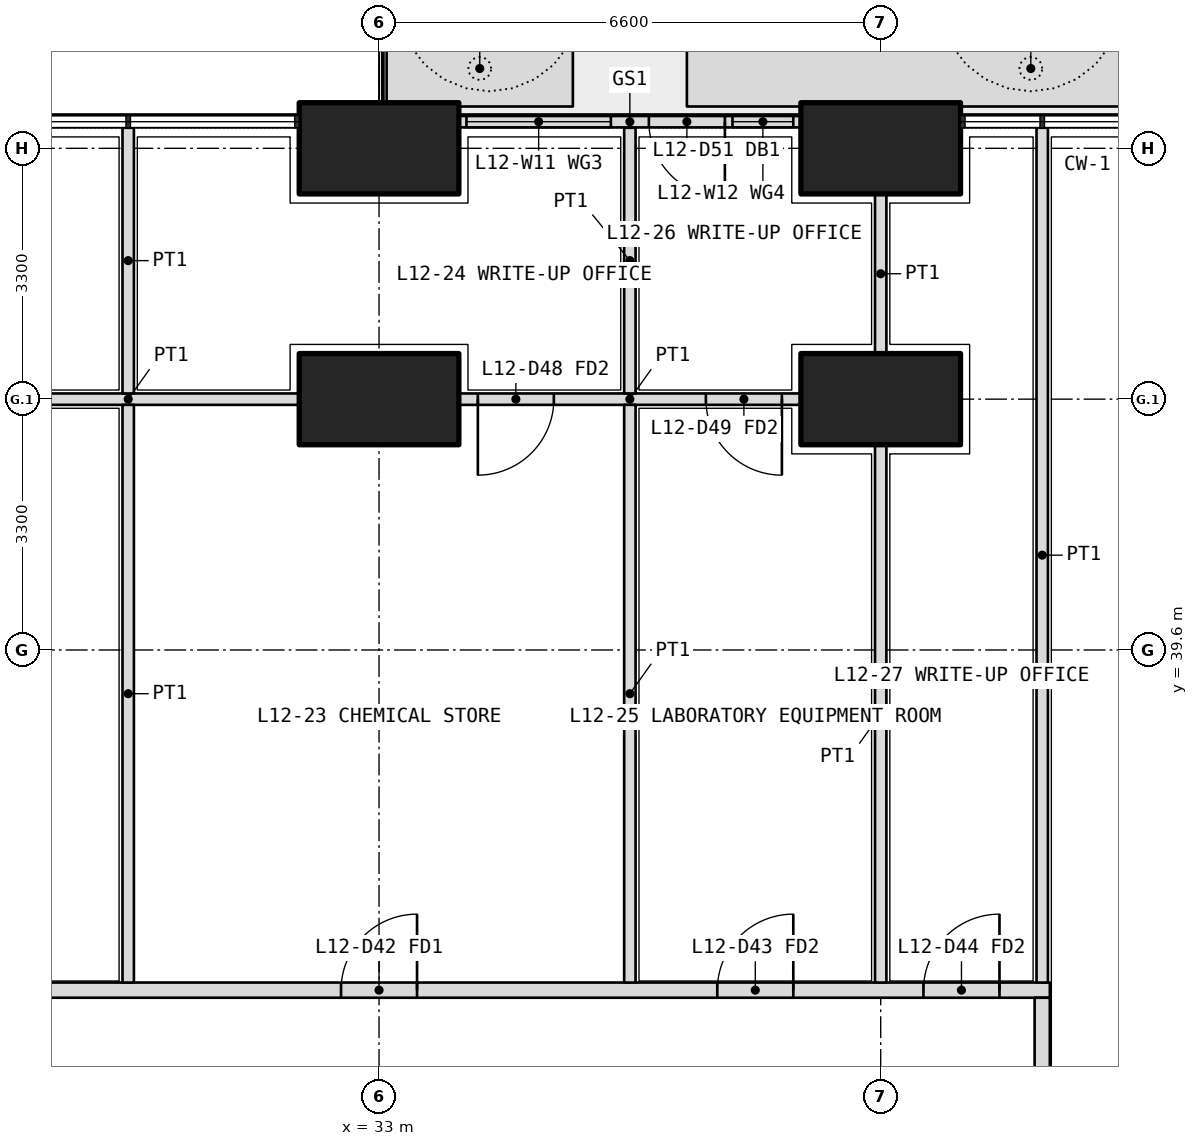
"""IFC4 building model, lengths in metres.
Left out: names, types, materials, properties, quantities, classifications, styles, units other than length and angle.
Written with IfcOpenShell. Run it as: python <this file> out.ifc"""

import sys

from ifc_helpers import new_model, si_unit, direction, frame, frame_2d, origin, origin_2d, place, context, subcontext, project, spatial, polyline, rectangle, outline, extrude, element, fill, save


model = new_model("IFC4")
c1 = context("Model", 3, precision=1e-05, world=origin(), true_north=direction((0.0, 1.0)))
c2 = subcontext(c1, "Body", "Model", "MODEL_VIEW")
j1 = project(units=[si_unit("LENGTHUNIT", "METRE"), si_unit("PLANEANGLEUNIT", "RADIAN")], contexts=[c1])
p1 = place(None, origin())
s1 = spatial("IfcSite", under=j1, at=p1, CompositionType="ELEMENT")
p2 = place(p1, origin())
s2 = spatial("IfcBuilding", under=s1, at=p2, CompositionType="ELEMENT")
p3 = place(p2, frame((0.0, 0.0, 54.9)))
s3 = spatial("IfcBuildingStorey", under=s2, at=p3, CompositionType="ELEMENT", Elevation=54.9)
for number, where, z_axis, x_axis in (
    (1, (33.0, 46.2, 0.0), (0.0, 0.0, 1.0), (1.0, 0.0, 0.0)),
    (2, (39.6, 46.2, 0.0), (0.0, 0.0, 1.0), (1.0, 0.0, 0.0)),
    (3, (33.0, 42.9, 0.0), (0.0, 0.0, 1.0), (1.0, 0.0, 0.0)),
    (4, (39.6, 42.9, 0.0), (0.0, 0.0, 1.0), (1.0, 0.0, 0.0)),
):
    element("IfcColumn", number, at=place(p3, frame(where, z_axis=z_axis, x_axis=x_axis)), inside=s3, PredefinedType="COLUMN", context=c2, shape_type="SweptSolid", body=[
        extrude(rectangle(XDim=2.1, YDim=1.2, at=origin_2d()), origin(), (0.0, 0.0, 1.0), 4.2),
    ])
p4 = place(p3, origin())
e5 = element("IfcWall", 5, at=p4, inside=s3, PredefinedType="USERDEFINED", context=c2, shape_type="SweptSolid", body=[
    extrude(outline(polyline([(33.1, 46.75), (35.55, 46.75), (35.55, 47.75), (33.1, 47.75), (33.1, 46.75)]), holes=[polyline([(33.25, 46.9), (35.4, 46.9), (35.4, 47.6), (33.25, 47.6), (33.25, 46.9)])]), origin(), (0.0, 0.0, 1.0), 1.05),
])
p5 = place(p3, origin())
e6 = element("IfcWall", 6, at=p5, inside=s3, PredefinedType="USERDEFINED", context=c2, shape_type="SweptSolid", body=[
    extrude(outline(polyline([(37.05, 46.75), (46.1, 46.75), (46.1, 47.75), (37.05, 47.75), (37.05, 46.75)]), holes=[polyline([(37.2, 46.9), (45.95, 46.9), (45.95, 47.6), (37.2, 47.6), (37.2, 46.9)])]), origin(), (0.0, 0.0, 1.0), 1.05),
])
p6 = place(p3, frame((38.55, 46.55, 0.0), z_axis=(0.0, 0.0, 1.0), x_axis=(-1.0, 0.0, 0.0)))
e7 = element("IfcWall", 7, at=p6, inside=s3, PredefinedType="SOLIDWALL", context=c2, shape_type="SweptSolid", body=[
    extrude(rectangle(XDim=4.5, YDim=0.15, at=frame_2d((2.25, 0.0))), origin(), (0.0, 0.0, 1.0), 2.7),
])
p7 = place(p6, frame((1.0, 0.0, 0.0)))
e8 = element("IfcOpeningElement", 8, at=p7, cuts=e7, PredefinedType="OPENING", context=c2, shape_type="SweptSolid", body=[
    extrude(rectangle(XDim=1.0, YDim=2.4, at=frame_2d((0.5, 1.2))), frame((0.0, 0.085, 0.0), z_axis=(0.0, -1.0, 0.0), x_axis=(1.0, 0.0, 0.0)), (0.0, 0.0, 1.0), 0.17),
])
p8 = place(p6, frame((0.1, 0.0, 0.1)))
e9 = element("IfcOpeningElement", 9, at=p8, cuts=e7, PredefinedType="OPENING", context=c2, shape_type="SweptSolid", body=[
    extrude(rectangle(XDim=0.8, YDim=2.3, at=frame_2d((0.4, 1.15))), frame((0.0, 0.085, 0.0), z_axis=(0.0, -1.0, 0.0), x_axis=(1.0, 0.0, 0.0)), (0.0, 0.0, 1.0), 0.17),
])
p9 = place(p6, frame((2.5, 0.0, 0.1)))
e10 = element("IfcOpeningElement", 10, at=p9, cuts=e7, PredefinedType="OPENING", context=c2, shape_type="SweptSolid", body=[
    extrude(rectangle(XDim=1.9, YDim=2.3, at=frame_2d((0.95, 1.15))), frame((0.0, 0.085, 0.0), z_axis=(0.0, -1.0, 0.0), x_axis=(1.0, 0.0, 0.0)), (0.0, 0.0, 1.0), 0.17),
])
p10 = place(p3, frame((10.975, 35.125, 0.0), z_axis=(0.0, 0.0, 1.0), x_axis=(1.0, 0.0, 0.0)))
e11 = element("IfcWall", 11, at=p10, inside=s3, PredefinedType="PARTITIONING", context=c2, shape_type="SweptSolid", body=[
    extrude(rectangle(XDim=30.85, YDim=0.2, at=frame_2d((15.425, 0.0))), origin(), (0.0, 0.0, 1.0), 2.85),
])
p11 = place(p10, frame((2.312, 0.0, 0.0)))
e12 = element("IfcOpeningElement", 12, at=p11, cuts=e11, PredefinedType="OPENING", context=c2, shape_type="SweptSolid", body=[
    extrude(rectangle(XDim=1.0, YDim=2.1, at=frame_2d((0.5, 1.05))), frame((0.0, 0.11, 0.0), z_axis=(0.0, -1.0, 0.0), x_axis=(1.0, 0.0, 0.0)), (0.0, 0.0, 1.0), 0.22),
])
p12 = place(p10, frame((11.625, 0.0, 0.0)))
e13 = element("IfcOpeningElement", 13, at=p12, cuts=e11, PredefinedType="OPENING", context=c2, shape_type="SweptSolid", body=[
    extrude(rectangle(XDim=1.0, YDim=2.1, at=frame_2d((0.5, 1.05))), frame((0.0, 0.11, 0.0), z_axis=(0.0, -1.0, 0.0), x_axis=(1.0, 0.0, 0.0)), (0.0, 0.0, 1.0), 0.22),
])
p13 = place(p10, frame((21.525, 0.0, 0.0)))
e14 = element("IfcOpeningElement", 14, at=p13, cuts=e11, PredefinedType="OPENING", context=c2, shape_type="SweptSolid", body=[
    extrude(rectangle(XDim=1.0, YDim=2.1, at=frame_2d((0.5, 1.05))), frame((0.0, 0.11, 0.0), z_axis=(0.0, -1.0, 0.0), x_axis=(1.0, 0.0, 0.0)), (0.0, 0.0, 1.0), 0.22),
])
p14 = place(p10, frame((26.475, 0.0, 0.0)))
e15 = element("IfcOpeningElement", 15, at=p14, cuts=e11, PredefinedType="OPENING", context=c2, shape_type="SweptSolid", body=[
    extrude(rectangle(XDim=1.0, YDim=2.1, at=frame_2d((0.5, 1.05))), frame((0.0, 0.11, 0.0), z_axis=(0.0, -1.0, 0.0), x_axis=(1.0, 0.0, 0.0)), (0.0, 0.0, 1.0), 0.22),
])
p15 = place(p10, frame((29.188, 0.0, 0.0)))
e16 = element("IfcOpeningElement", 16, at=p15, cuts=e11, PredefinedType="OPENING", context=c2, shape_type="SweptSolid", body=[
    extrude(rectangle(XDim=1.0, YDim=2.1, at=frame_2d((0.5, 1.05))), frame((0.0, 0.11, 0.0), z_axis=(0.0, -1.0, 0.0), x_axis=(1.0, 0.0, 0.0)), (0.0, 0.0, 1.0), 0.22),
])
p16 = place(p3, frame((41.725, 11.175, 0.0), z_axis=(0.0, 0.0, 1.0), x_axis=(0.0, 1.0, 0.0)))
e17 = element("IfcWall", 17, at=p16, inside=s3, PredefinedType="PARTITIONING", context=c2, shape_type="SweptSolid", body=[
    extrude(rectangle(XDim=23.85, YDim=0.2, at=frame_2d((11.925, 0.0))), origin(), (0.0, 0.0, 1.0), 2.85),
])
p17 = place(p16, frame((2.012, 0.0, 0.0)))
e18 = element("IfcOpeningElement", 18, at=p17, cuts=e17, PredefinedType="OPENING", context=c2, shape_type="SweptSolid", body=[
    extrude(rectangle(XDim=1.2, YDim=2.1, at=frame_2d((0.6, 1.05))), frame((0.0, 0.11, 0.0), z_axis=(0.0, -1.0, 0.0), x_axis=(1.0, 0.0, 0.0)), (0.0, 0.0, 1.0), 0.22),
])
p18 = place(p16, frame((6.475, 0.0, 0.0)))
e19 = element("IfcOpeningElement", 19, at=p18, cuts=e17, PredefinedType="OPENING", context=c2, shape_type="SweptSolid", body=[
    extrude(rectangle(XDim=1.0, YDim=2.1, at=frame_2d((0.5, 1.05))), frame((0.0, 0.11, 0.0), z_axis=(0.0, -1.0, 0.0), x_axis=(1.0, 0.0, 0.0)), (0.0, 0.0, 1.0), 0.22),
])
p19 = place(p16, frame((9.625, 0.0, 0.0)))
e20 = element("IfcOpeningElement", 20, at=p19, cuts=e17, PredefinedType="OPENING", context=c2, shape_type="SweptSolid", body=[
    extrude(rectangle(XDim=1.0, YDim=2.1, at=frame_2d((0.5, 1.05))), frame((0.0, 0.11, 0.0), z_axis=(0.0, -1.0, 0.0), x_axis=(1.0, 0.0, 0.0)), (0.0, 0.0, 1.0), 0.22),
])
p20 = place(p16, frame((12.975, 0.0, 0.0)))
e21 = element("IfcOpeningElement", 21, at=p20, cuts=e17, PredefinedType="OPENING", context=c2, shape_type="SweptSolid", body=[
    extrude(rectangle(XDim=0.9, YDim=2.1, at=frame_2d((0.45, 1.05))), frame((0.0, 0.11, 0.0), z_axis=(0.0, -1.0, 0.0), x_axis=(1.0, 0.0, 0.0)), (0.0, 0.0, 1.0), 0.22),
])
p21 = place(p16, frame((16.375, 0.0, 0.0)))
e22 = element("IfcOpeningElement", 22, at=p21, cuts=e17, PredefinedType="OPENING", context=c2, shape_type="SweptSolid", body=[
    extrude(rectangle(XDim=1.0, YDim=2.1, at=frame_2d((0.5, 1.05))), frame((0.0, 0.11, 0.0), z_axis=(0.0, -1.0, 0.0), x_axis=(1.0, 0.0, 0.0)), (0.0, 0.0, 1.0), 0.22),
])
p22 = place(p16, frame((20.738, 0.0, 0.0)))
e23 = element("IfcOpeningElement", 23, at=p22, cuts=e17, PredefinedType="OPENING", context=c2, shape_type="SweptSolid", body=[
    extrude(rectangle(XDim=1.0, YDim=2.1, at=frame_2d((0.5, 1.05))), frame((0.0, 0.11, 0.0), z_axis=(0.0, -1.0, 0.0), x_axis=(1.0, 0.0, 0.0)), (0.0, 0.0, 1.0), 0.22),
])
p23 = place(p3, frame((41.725, 46.47, 0.0), z_axis=(0.0, 0.0, 1.0), x_axis=(0.0, -1.0, 0.0)))
e24 = element("IfcWall", 24, at=p23, inside=s3, PredefinedType="PARTITIONING", context=c2, shape_type="SweptSolid", body=[
    extrude(rectangle(XDim=11.245, YDim=0.15, at=frame_2d((5.623, 0.0))), origin(), (0.0, 0.0, 1.0), 2.7),
])
p24 = place(p3, frame((38.55, 42.9, 0.0), z_axis=(0.0, 0.0, 1.0), x_axis=(-1.0, 0.0, 0.0)))
e25 = element("IfcWall", 25, at=p24, inside=s3, PredefinedType="PARTITIONING", context=c2, shape_type="SweptSolid", body=[
    extrude(rectangle(XDim=4.5, YDim=0.15, at=frame_2d((2.25, 0.0))), origin(), (0.0, 0.0, 1.0), 3.9),
])
p25 = place(p24, frame((3.25, 0.0, 0.0)))
e26 = element("IfcOpeningElement", 26, at=p25, cuts=e25, PredefinedType="OPENING", context=c2, shape_type="SweptSolid", body=[
    extrude(rectangle(XDim=1.0, YDim=2.1, at=frame_2d((0.5, 1.05))), frame((0.0, 0.085, 0.0), z_axis=(0.0, -1.0, 0.0), x_axis=(1.0, 0.0, 0.0)), (0.0, 0.0, 1.0), 0.17),
])
p26 = place(p24, frame((0.25, 0.0, 0.0)))
e27 = element("IfcOpeningElement", 27, at=p26, cuts=e25, PredefinedType="OPENING", context=c2, shape_type="SweptSolid", body=[
    extrude(rectangle(XDim=1.0, YDim=2.1, at=frame_2d((0.5, 1.05))), frame((0.0, 0.085, 0.0), z_axis=(0.0, -1.0, 0.0), x_axis=(1.0, 0.0, 0.0)), (0.0, 0.0, 1.0), 0.17),
])
p27 = place(p3, frame((31.95, 42.9, 0.0), z_axis=(0.0, 0.0, 1.0), x_axis=(-1.0, 0.0, 0.0)))
e28 = element("IfcWall", 28, at=p27, inside=s3, PredefinedType="PARTITIONING", context=c2, shape_type="SweptSolid", body=[
    extrude(rectangle(XDim=4.5, YDim=0.15, at=frame_2d((2.25, 0.0))), origin(), (0.0, 0.0, 1.0), 3.9),
])
p28 = place(p3, frame((29.7, 46.47, 0.0), z_axis=(0.0, 0.0, 1.0), x_axis=(0.0, -1.0, 0.0)))
e29 = element("IfcWall", 29, at=p28, inside=s3, PredefinedType="PARTITIONING", context=c2, shape_type="SweptSolid", body=[
    extrude(rectangle(XDim=3.495, YDim=0.15, at=frame_2d((1.748, 0.0))), origin(), (0.0, 0.0, 1.0), 2.7),
])
p29 = place(p3, frame((29.7, 42.825, 0.0), z_axis=(0.0, 0.0, 1.0), x_axis=(0.0, -1.0, 0.0)))
e30 = element("IfcWall", 30, at=p29, inside=s3, PredefinedType="PARTITIONING", context=c2, shape_type="SweptSolid", body=[
    extrude(rectangle(XDim=7.6, YDim=0.15, at=frame_2d((3.8, 0.0))), origin(), (0.0, 0.0, 1.0), 3.9),
])
p30 = place(p3, frame((36.3, 46.47, 0.0), z_axis=(0.0, 0.0, 1.0), x_axis=(0.0, -1.0, 0.0)))
e31 = element("IfcWall", 31, at=p30, inside=s3, PredefinedType="PARTITIONING", context=c2, shape_type="SweptSolid", body=[
    extrude(rectangle(XDim=3.495, YDim=0.15, at=frame_2d((1.748, 0.0))), origin(), (0.0, 0.0, 1.0), 2.7),
])
p31 = place(p3, frame((36.3, 42.825, 0.0), z_axis=(0.0, 0.0, 1.0), x_axis=(0.0, -1.0, 0.0)))
e32 = element("IfcWall", 32, at=p31, inside=s3, PredefinedType="PARTITIONING", context=c2, shape_type="SweptSolid", body=[
    extrude(rectangle(XDim=7.6, YDim=0.15, at=frame_2d((3.8, 0.0))), origin(), (0.0, 0.0, 1.0), 3.9),
])
p32 = place(p3, frame((39.6, 45.6, 0.0), z_axis=(0.0, 0.0, 1.0), x_axis=(0.0, -1.0, 0.0)))
e33 = element("IfcWall", 33, at=p32, inside=s3, PredefinedType="PARTITIONING", context=c2, shape_type="SweptSolid", body=[
    extrude(rectangle(XDim=2.1, YDim=0.15, at=frame_2d((1.05, 0.0))), origin(), (0.0, 0.0, 1.0), 2.85),
])
p33 = place(p3, frame((39.6, 42.3, 0.0), z_axis=(0.0, 0.0, 1.0), x_axis=(0.0, -1.0, 0.0)))
e34 = element("IfcWall", 34, at=p33, inside=s3, PredefinedType="PARTITIONING", context=c2, shape_type="SweptSolid", body=[
    extrude(rectangle(XDim=7.075, YDim=0.15, at=frame_2d((3.538, 0.0))), origin(), (0.0, 0.0, 1.0), 2.85),
])
p34 = place(p7, origin())
e35 = element("IfcDoor", 35, at=p34, inside=s3, OperationType="SINGLE_SWING_LEFT", PredefinedType="DOOR", context=c2, shape_type="SweptSolid", body=[
    extrude(rectangle(XDim=1.0, YDim=2.4, at=frame_2d((0.5, 1.2))), frame((0.0, 0.025, 0.0), z_axis=(0.0, -1.0, 0.0), x_axis=(1.0, 0.0, 0.0)), (0.0, 0.0, 1.0), 0.05),
])
fill(e8, e35)
p35 = place(p8, origin())
e36 = element("IfcWindow", 36, at=p35, inside=s3, PartitioningType="SINGLE_PANEL", PredefinedType="WINDOW", context=c2, shape_type="SweptSolid", body=[
    extrude(rectangle(XDim=0.8, YDim=2.3, at=frame_2d((0.4, 1.15))), frame((0.0, 0.03, 0.0), z_axis=(0.0, -1.0, 0.0), x_axis=(1.0, 0.0, 0.0)), (0.0, 0.0, 1.0), 0.06),
])
fill(e9, e36)
p36 = place(p9, origin())
e37 = element("IfcWindow", 37, at=p36, inside=s3, PartitioningType="SINGLE_PANEL", PredefinedType="WINDOW", context=c2, shape_type="SweptSolid", body=[
    extrude(rectangle(XDim=1.9, YDim=2.3, at=frame_2d((0.95, 1.15))), frame((0.0, 0.03, 0.0), z_axis=(0.0, -1.0, 0.0), x_axis=(1.0, 0.0, 0.0)), (0.0, 0.0, 1.0), 0.06),
])
fill(e10, e37)
p37 = place(p13, origin())
e38 = element("IfcDoor", 38, at=p37, inside=s3, OperationType="SINGLE_SWING_RIGHT", PredefinedType="DOOR", context=c2, shape_type="SweptSolid", body=[
    extrude(rectangle(XDim=1.0, YDim=2.1, at=frame_2d((0.5, 1.05))), frame((0.0, 0.025, 0.0), z_axis=(0.0, -1.0, 0.0), x_axis=(1.0, 0.0, 0.0)), (0.0, 0.0, 1.0), 0.05),
])
fill(e14, e38)
p38 = place(p25, origin())
e39 = element("IfcDoor", 39, at=p38, inside=s3, OperationType="SINGLE_SWING_RIGHT", PredefinedType="DOOR", context=c2, shape_type="SweptSolid", body=[
    extrude(rectangle(XDim=1.0, YDim=2.1, at=frame_2d((0.5, 1.05))), frame((0.0, 0.025, 0.0), z_axis=(0.0, -1.0, 0.0), x_axis=(1.0, 0.0, 0.0)), (0.0, 0.0, 1.0), 0.05),
])
fill(e26, e39)
p39 = place(p14, origin())
e40 = element("IfcDoor", 40, at=p39, inside=s3, OperationType="SINGLE_SWING_RIGHT", PredefinedType="DOOR", context=c2, shape_type="SweptSolid", body=[
    extrude(rectangle(XDim=1.0, YDim=2.1, at=frame_2d((0.5, 1.05))), frame((0.0, 0.025, 0.0), z_axis=(0.0, -1.0, 0.0), x_axis=(1.0, 0.0, 0.0)), (0.0, 0.0, 1.0), 0.05),
])
fill(e15, e40)
p40 = place(p26, origin())
e41 = element("IfcDoor", 41, at=p40, inside=s3, OperationType="SINGLE_SWING_LEFT", PredefinedType="DOOR", context=c2, shape_type="SweptSolid", body=[
    extrude(rectangle(XDim=1.0, YDim=2.1, at=frame_2d((0.5, 1.05))), frame((0.0, 0.025, 0.0), z_axis=(0.0, -1.0, 0.0), x_axis=(1.0, 0.0, 0.0)), (0.0, 0.0, 1.0), 0.05),
])
fill(e27, e41)
p41 = place(p15, origin())
e42 = element("IfcDoor", 42, at=p41, inside=s3, OperationType="SINGLE_SWING_RIGHT", PredefinedType="DOOR", context=c2, shape_type="SweptSolid", body=[
    extrude(rectangle(XDim=1.0, YDim=2.1, at=frame_2d((0.5, 1.05))), frame((0.0, 0.025, 0.0), z_axis=(0.0, -1.0, 0.0), x_axis=(1.0, 0.0, 0.0)), (0.0, 0.0, 1.0), 0.05),
])
fill(e16, e42)
save(model, sys.argv[1])
